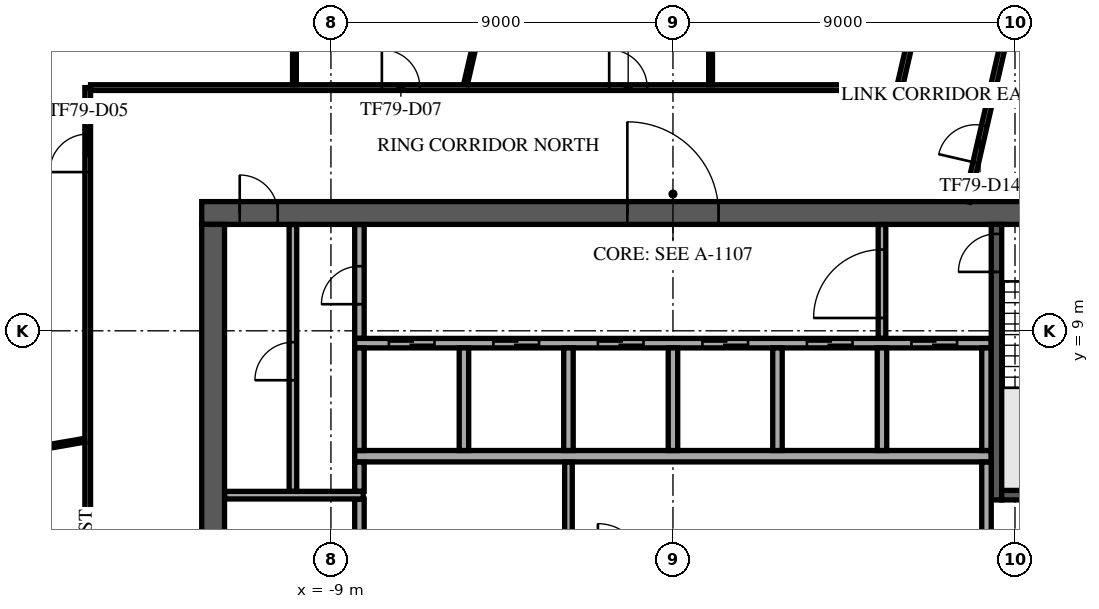
"""IFC4 building model, lengths in metres.
Left out: names, types, materials, properties, quantities, classifications, styles, units other than length and angle.
Written with IfcOpenShell. Run it as: python <this file> out.ifc"""

import sys

from ifc_helpers import new_model, si_unit, direction, frame, frame_2d, origin, place, context, subcontext, project, spatial, rectangle, extrude, element, fill, save


model = new_model("IFC4")
c1 = context("Model", 3, precision=1e-05, world=origin(), true_north=direction((0.0, 1.0)))
c2 = subcontext(c1, "Body", "Model", "MODEL_VIEW")
j1 = project(units=[si_unit("LENGTHUNIT", "METRE"), si_unit("PLANEANGLEUNIT", "RADIAN")], contexts=[c1])
p1 = place(None, origin())
s1 = spatial("IfcSite", under=j1, at=p1, CompositionType="ELEMENT")
p2 = place(p1, origin())
s2 = spatial("IfcBuilding", under=s1, at=p2, CompositionType="ELEMENT")
p3 = place(p2, frame((0.0, 0.0, 332.5)))
s3 = spatial("IfcBuildingStorey", under=s2, at=p3, CompositionType="ELEMENT", Elevation=332.5)
p4 = place(p3, frame((-12.4, 12.1, 0.0), z_axis=(0.0, 0.0, 1.0), x_axis=(1.0, 0.0, 0.0)))
e1 = element("IfcWall", 1, at=p4, inside=s3, PredefinedType="SHEAR", context=c2, shape_type="SweptSolid", body=[
    extrude(rectangle(XDim=24.8, YDim=0.6, at=frame_2d((12.4, 0.0))), origin(), (0.0, 0.0, 1.0), 3.65),
])
p5 = place(p4, frame((11.2, 0.0, 0.0)))
e2 = element("IfcOpeningElement", 2, at=p5, cuts=e1, PredefinedType="OPENING", context=c2, shape_type="SweptSolid", body=[
    extrude(rectangle(XDim=2.4, YDim=2.4, at=frame_2d((1.2, 1.2))), frame((0.0, 0.31, 0.0), z_axis=(0.0, -1.0, 0.0), x_axis=(1.0, 0.0, 0.0)), (0.0, 0.0, 1.0), 0.62),
])
p6 = place(p4, frame((22.025, 0.0, 0.0)))
e3 = element("IfcOpeningElement", 3, at=p6, cuts=e1, PredefinedType="OPENING", context=c2, shape_type="SweptSolid", body=[
    extrude(rectangle(XDim=1.2, YDim=2.1, at=frame_2d((0.6, 1.05))), frame((0.0, 0.31, 0.0), z_axis=(0.0, -1.0, 0.0), x_axis=(1.0, 0.0, 0.0)), (0.0, 0.0, 1.0), 0.62),
])
p7 = place(p4, frame((1.0, 0.0, 0.0)))
e4 = element("IfcOpeningElement", 4, at=p7, cuts=e1, PredefinedType="OPENING", context=c2, shape_type="SweptSolid", body=[
    extrude(rectangle(XDim=1.0, YDim=2.1, at=frame_2d((0.5, 1.05))), frame((0.0, 0.31, 0.0), z_axis=(0.0, -1.0, 0.0), x_axis=(1.0, 0.0, 0.0)), (0.0, 0.0, 1.0), 0.62),
])
p8 = place(p3, frame((-12.1, -11.8, 0.0), z_axis=(0.0, 0.0, 1.0), x_axis=(0.0, 1.0, 0.0)))
e5 = element("IfcWall", 5, at=p8, inside=s3, PredefinedType="SHEAR", context=c2, shape_type="SweptSolid", body=[
    extrude(rectangle(XDim=23.6, YDim=0.6, at=frame_2d((11.8, 0.0))), origin(), (0.0, 0.0, 1.0), 3.65),
])
p9 = place(p8, frame((10.6, 0.0, 0.0)))
e6 = element("IfcOpeningElement", 6, at=p9, cuts=e5, PredefinedType="OPENING", context=c2, shape_type="SweptSolid", body=[
    extrude(rectangle(XDim=2.4, YDim=2.4, at=frame_2d((1.2, 1.2))), frame((0.0, 0.31, 0.0), z_axis=(0.0, -1.0, 0.0), x_axis=(1.0, 0.0, 0.0)), (0.0, 0.0, 1.0), 0.62),
])
p10 = place(p3, frame((-8.375, 5.7, 0.0), z_axis=(0.0, 0.0, 1.0), x_axis=(1.0, 0.0, 0.0)))
e7 = element("IfcWall", 7, at=p10, inside=s3, PredefinedType="SOLIDWALL", context=c2, shape_type="SweptSolid", body=[
    extrude(rectangle(XDim=16.75, YDim=0.3, at=frame_2d((8.375, 0.0))), origin(), (0.0, 0.0, 1.0), 3.65),
])
p11 = place(p3, frame((-8.375, 8.675, 0.0), z_axis=(0.0, 0.0, 1.0), x_axis=(1.0, 0.0, 0.0)))
e8 = element("IfcWall", 8, at=p11, inside=s3, PredefinedType="SOLIDWALL", context=c2, shape_type="SweptSolid", body=[
    extrude(rectangle(XDim=16.75, YDim=0.25, at=frame_2d((8.375, 0.0))), origin(), (0.0, 0.0, 1.0), 3.65),
])
p12 = place(p11, frame((0.9, 0.0, 0.0)))
e9 = element("IfcOpeningElement", 9, at=p12, cuts=e8, PredefinedType="OPENING", context=c2, shape_type="SweptSolid", body=[
    extrude(rectangle(XDim=1.2, YDim=2.1, at=frame_2d((0.6, 1.05))), frame((0.0, 0.135, 0.0), z_axis=(0.0, -1.0, 0.0), x_axis=(1.0, 0.0, 0.0)), (0.0, 0.0, 1.0), 0.27),
])
p13 = place(p11, frame((3.65, 0.0, 0.0)))
e10 = element("IfcOpeningElement", 10, at=p13, cuts=e8, PredefinedType="OPENING", context=c2, shape_type="SweptSolid", body=[
    extrude(rectangle(XDim=1.2, YDim=2.1, at=frame_2d((0.6, 1.05))), frame((0.0, 0.135, 0.0), z_axis=(0.0, -1.0, 0.0), x_axis=(1.0, 0.0, 0.0)), (0.0, 0.0, 1.0), 0.27),
])
p14 = place(p11, frame((6.4, 0.0, 0.0)))
e11 = element("IfcOpeningElement", 11, at=p14, cuts=e8, PredefinedType="OPENING", context=c2, shape_type="SweptSolid", body=[
    extrude(rectangle(XDim=1.2, YDim=2.1, at=frame_2d((0.6, 1.05))), frame((0.0, 0.135, 0.0), z_axis=(0.0, -1.0, 0.0), x_axis=(1.0, 0.0, 0.0)), (0.0, 0.0, 1.0), 0.27),
])
p15 = place(p11, frame((9.15, 0.0, 0.0)))
e12 = element("IfcOpeningElement", 12, at=p15, cuts=e8, PredefinedType="OPENING", context=c2, shape_type="SweptSolid", body=[
    extrude(rectangle(XDim=1.2, YDim=2.1, at=frame_2d((0.6, 1.05))), frame((0.0, 0.135, 0.0), z_axis=(0.0, -1.0, 0.0), x_axis=(1.0, 0.0, 0.0)), (0.0, 0.0, 1.0), 0.27),
])
p16 = place(p11, frame((11.9, 0.0, 0.0)))
e13 = element("IfcOpeningElement", 13, at=p16, cuts=e8, PredefinedType="OPENING", context=c2, shape_type="SweptSolid", body=[
    extrude(rectangle(XDim=1.2, YDim=2.1, at=frame_2d((0.6, 1.05))), frame((0.0, 0.135, 0.0), z_axis=(0.0, -1.0, 0.0), x_axis=(1.0, 0.0, 0.0)), (0.0, 0.0, 1.0), 0.27),
])
p17 = place(p11, frame((14.65, 0.0, 0.0)))
e14 = element("IfcOpeningElement", 14, at=p17, cuts=e8, PredefinedType="OPENING", context=c2, shape_type="SweptSolid", body=[
    extrude(rectangle(XDim=1.2, YDim=2.1, at=frame_2d((0.6, 1.05))), frame((0.0, 0.135, 0.0), z_axis=(0.0, -1.0, 0.0), x_axis=(1.0, 0.0, 0.0)), (0.0, 0.0, 1.0), 0.27),
])
for number, where, z_axis, x_axis in (
    (15, (-8.25, 5.85, 0.0), (0.0, 0.0, 1.0), (0.0, 1.0, 0.0)),
    (16, (-5.5, 5.85, 0.0), (0.0, 0.0, 1.0), (0.0, 1.0, 0.0)),
    (17, (-2.75, 5.85, 0.0), (0.0, 0.0, 1.0), (0.0, 1.0, 0.0)),
    (18, (0.0, 5.85, 0.0), (0.0, 0.0, 1.0), (0.0, 1.0, 0.0)),
    (19, (2.75, 5.85, 0.0), (0.0, 0.0, 1.0), (0.0, 1.0, 0.0)),
    (20, (5.5, 5.85, 0.0), (0.0, 0.0, 1.0), (0.0, 1.0, 0.0)),
    (21, (8.25, 5.85, 0.0), (0.0, 0.0, 1.0), (0.0, 1.0, 0.0)),
):
    element("IfcWall", number, at=place(p3, frame(where, z_axis=z_axis, x_axis=x_axis)), inside=s3, PredefinedType="SOLIDWALL", context=c2, shape_type="SweptSolid", body=[
        extrude(rectangle(XDim=2.7, YDim=0.25, at=frame_2d((1.35, 0.0))), origin(), (0.0, 0.0, 1.0), 3.65),
    ])
p18 = place(p3, frame((8.512, 4.55, 0.0), z_axis=(0.0, 0.0, 1.0), x_axis=(0.0, 1.0, 0.0)))
e22 = element("IfcWall", 22, at=p18, inside=s3, PredefinedType="SOLIDWALL", context=c2, shape_type="SweptSolid", body=[
    extrude(rectangle(XDim=7.25, YDim=0.275, at=frame_2d((3.625, 0.0))), origin(), (0.0, 0.0, 1.0), 3.65),
])
p19 = place(p18, frame((6.0, 0.0, 0.0)))
e23 = element("IfcOpeningElement", 23, at=p19, cuts=e22, PredefinedType="OPENING", context=c2, shape_type="SweptSolid", body=[
    extrude(rectangle(XDim=1.0, YDim=2.1, at=frame_2d((0.5, 1.05))), frame((0.0, 0.147, 0.0), z_axis=(0.0, -1.0, 0.0), x_axis=(1.0, 0.0, 0.0)), (0.0, 0.0, 1.0), 0.295),
])
p20 = place(p3, frame((8.65, 4.675, 0.0), z_axis=(0.0, 0.0, 1.0), x_axis=(1.0, 0.0, 0.0)))
e24 = element("IfcWall", 24, at=p20, inside=s3, PredefinedType="SOLIDWALL", context=c2, shape_type="SweptSolid", body=[
    extrude(rectangle(XDim=3.15, YDim=0.25, at=frame_2d((1.575, 0.0))), origin(), (0.0, 0.0, 1.0), 3.65),
])
p21 = place(p3, frame((-8.25, 2.855, 0.0), z_axis=(0.0, 0.0, 1.0), x_axis=(0.0, 1.0, 0.0)))
e25 = element("IfcWall", 25, at=p21, inside=s3, PredefinedType="PARTITIONING", context=c2, shape_type="SweptSolid", body=[
    extrude(rectangle(XDim=1.715, YDim=0.25, at=frame_2d((0.857, 0.0))), origin(), (0.0, 0.0, 1.0), 3.65),
])
p22 = place(p3, frame((-2.75, 2.855, 0.0), z_axis=(0.0, 0.0, 1.0), x_axis=(0.0, 1.0, 0.0)))
e26 = element("IfcWall", 26, at=p22, inside=s3, PredefinedType="PARTITIONING", context=c2, shape_type="SweptSolid", body=[
    extrude(rectangle(XDim=2.69, YDim=0.2, at=frame_2d((1.345, 0.0))), origin(), (0.0, 0.0, 1.0), 3.65),
])
p23 = place(p3, frame((8.25, 2.855, 0.0), z_axis=(0.0, 0.0, 1.0), x_axis=(0.0, 1.0, 0.0)))
e27 = element("IfcWall", 27, at=p23, inside=s3, PredefinedType="PARTITIONING", context=c2, shape_type="SweptSolid", body=[
    extrude(rectangle(XDim=2.69, YDim=0.25, at=frame_2d((1.345, 0.0))), origin(), (0.0, 0.0, 1.0), 3.65),
])
p24 = place(p3, frame((-11.795, 4.675, 0.0), z_axis=(0.0, 0.0, 1.0), x_axis=(1.0, 0.0, 0.0)))
e28 = element("IfcWall", 28, at=p24, inside=s3, PredefinedType="PARTITIONING", context=c2, shape_type="SweptSolid", body=[
    extrude(rectangle(XDim=3.645, YDim=0.2, at=frame_2d((1.823, 0.0))), origin(), (0.0, 0.0, 1.0), 3.65),
])
p25 = place(p3, frame((-10.0, 4.78, 0.0), z_axis=(0.0, 0.0, 1.0), x_axis=(0.0, 1.0, 0.0)))
e29 = element("IfcWall", 29, at=p25, inside=s3, PredefinedType="PARTITIONING", context=c2, shape_type="SweptSolid", body=[
    extrude(rectangle(XDim=7.015, YDim=0.2, at=frame_2d((3.507, 0.0))), origin(), (0.0, 0.0, 1.0), 3.65),
])
p26 = place(p25, frame((2.92, 0.0, 0.0)))
e30 = element("IfcOpeningElement", 30, at=p26, cuts=e29, PredefinedType="OPENING", context=c2, shape_type="SweptSolid", body=[
    extrude(rectangle(XDim=1.0, YDim=2.1, at=frame_2d((0.5, 1.05))), frame((0.0, 0.11, 0.0), z_axis=(0.0, -1.0, 0.0), x_axis=(1.0, 0.0, 0.0)), (0.0, 0.0, 1.0), 0.22),
])
p27 = place(p3, frame((-8.25, 4.78, 0.0), z_axis=(0.0, 0.0, 1.0), x_axis=(0.0, 1.0, 0.0)))
e31 = element("IfcWall", 31, at=p27, inside=s3, PredefinedType="PARTITIONING", context=c2, shape_type="SweptSolid", body=[
    extrude(rectangle(XDim=0.765, YDim=0.25, at=frame_2d((0.382, 0.0))), origin(), (0.0, 0.0, 1.0), 3.65),
])
p28 = place(p3, frame((-8.25, 8.805, 0.0), z_axis=(0.0, 0.0, 1.0), x_axis=(0.0, 1.0, 0.0)))
e32 = element("IfcWall", 32, at=p28, inside=s3, PredefinedType="PARTITIONING", context=c2, shape_type="SweptSolid", body=[
    extrude(rectangle(XDim=2.99, YDim=0.25, at=frame_2d((1.495, 0.0))), origin(), (0.0, 0.0, 1.0), 3.65),
])
p29 = place(p28, frame((0.895, 0.0, 0.0)))
e33 = element("IfcOpeningElement", 33, at=p29, cuts=e32, PredefinedType="OPENING", context=c2, shape_type="SweptSolid", body=[
    extrude(rectangle(XDim=1.0, YDim=2.1, at=frame_2d((0.5, 1.05))), frame((0.0, 0.135, 0.0), z_axis=(0.0, -1.0, 0.0), x_axis=(1.0, 0.0, 0.0)), (0.0, 0.0, 1.0), 0.27),
])
p30 = place(p3, frame((5.5, 8.805, 0.0), z_axis=(0.0, 0.0, 1.0), x_axis=(0.0, 1.0, 0.0)))
e34 = element("IfcWall", 34, at=p30, inside=s3, PredefinedType="PARTITIONING", context=c2, shape_type="SweptSolid", body=[
    extrude(rectangle(XDim=2.99, YDim=0.2, at=frame_2d((1.495, 0.0))), origin(), (0.0, 0.0, 1.0), 3.65),
])
p31 = place(p30, frame((0.532, 0.0, 0.0)))
e35 = element("IfcOpeningElement", 35, at=p31, cuts=e34, PredefinedType="OPENING", context=c2, shape_type="SweptSolid", body=[
    extrude(rectangle(XDim=1.8, YDim=2.1, at=frame_2d((0.9, 1.05))), frame((0.0, 0.11, 0.0), z_axis=(0.0, -1.0, 0.0), x_axis=(1.0, 0.0, 0.0)), (0.0, 0.0, 1.0), 0.22),
])
p32 = place(p3, frame((-15.4, -15.4, 0.0), z_axis=(0.0, 0.0, 1.0), x_axis=(0.0, 1.0, 0.0)))
e36 = element("IfcWall", 36, at=p32, inside=s3, PredefinedType="PARTITIONING", context=c2, shape_type="SweptSolid", body=[
    extrude(rectangle(XDim=30.8, YDim=0.15, at=frame_2d((15.4, 0.0))), origin(), (0.0, 0.0, 1.0), 3.25),
])
p33 = place(p32, frame((12.741, 0.0, 0.0)))
e37 = element("IfcOpeningElement", 37, at=p33, cuts=e36, PredefinedType="OPENING", context=c2, shape_type="SweptSolid", body=[
    extrude(rectangle(XDim=1.0, YDim=2.1, at=frame_2d((0.5, 1.05))), frame((0.0, 0.085, 0.0), z_axis=(0.0, -1.0, 0.0), x_axis=(1.0, 0.0, 0.0)), (0.0, 0.0, 1.0), 0.17),
])
p34 = place(p32, frame((6.05, 0.0, 0.0)))
e38 = element("IfcOpeningElement", 38, at=p34, cuts=e36, PredefinedType="OPENING", context=c2, shape_type="SweptSolid", body=[
    extrude(rectangle(XDim=1.8, YDim=2.1, at=frame_2d((0.9, 1.05))), frame((0.0, 0.085, 0.0), z_axis=(0.0, -1.0, 0.0), x_axis=(1.0, 0.0, 0.0)), (0.0, 0.0, 1.0), 0.17),
])
p35 = place(p32, frame((28.577, 0.0, 0.0)))
e39 = element("IfcOpeningElement", 39, at=p35, cuts=e36, PredefinedType="OPENING", context=c2, shape_type="SweptSolid", body=[
    extrude(rectangle(XDim=1.0, YDim=2.1, at=frame_2d((0.5, 1.05))), frame((0.0, 0.085, 0.0), z_axis=(0.0, -1.0, 0.0), x_axis=(1.0, 0.0, 0.0)), (0.0, 0.0, 1.0), 0.17),
])
p36 = place(p3, frame((-15.325, 15.4, 0.0), z_axis=(0.0, 0.0, 1.0), x_axis=(1.0, 0.0, 0.0)))
e40 = element("IfcWall", 40, at=p36, inside=s3, PredefinedType="PARTITIONING", context=c2, shape_type="SweptSolid", body=[
    extrude(rectangle(XDim=21.285, YDim=0.15, at=frame_2d((10.643, 0.0))), origin(), (0.0, 0.0, 1.0), 3.25),
])
p37 = place(p36, frame((7.665, 0.0, 0.0)))
e41 = element("IfcOpeningElement", 41, at=p37, cuts=e40, PredefinedType="OPENING", context=c2, shape_type="SweptSolid", body=[
    extrude(rectangle(XDim=1.0, YDim=2.1, at=frame_2d((0.5, 1.05))), frame((0.0, 0.085, 0.0), z_axis=(0.0, -1.0, 0.0), x_axis=(1.0, 0.0, 0.0)), (0.0, 0.0, 1.0), 0.17),
])
p38 = place(p36, frame((13.647, 0.0, 0.0)))
e42 = element("IfcOpeningElement", 42, at=p38, cuts=e40, PredefinedType="OPENING", context=c2, shape_type="SweptSolid", body=[
    extrude(rectangle(XDim=1.0, YDim=2.1, at=frame_2d((0.5, 1.05))), frame((0.0, 0.085, 0.0), z_axis=(0.0, -1.0, 0.0), x_axis=(1.0, 0.0, 0.0)), (0.0, 0.0, 1.0), 0.17),
])
p39 = place(p3, frame((5.981, 15.492, 0.0), z_axis=(0.0, 0.0, 1.0), x_axis=(0.224777043794, 0.97441022192, 0.0)))
e43 = element("IfcWall", 43, at=p39, inside=s3, PredefinedType="PARTITIONING", context=c2, shape_type="SweptSolid", body=[
    extrude(rectangle(XDim=2.811, YDim=0.15, at=frame_2d((1.406, 0.0))), origin(), (0.0, 0.0, 1.0), 3.65),
])
p40 = place(p3, frame((7.731, 12.4, 0.0), z_axis=(0.0, 0.0, 1.0), x_axis=(0.224891896022, 0.974383720668, 0.0)))
e44 = element("IfcWall", 44, at=p40, inside=s3, PredefinedType="PARTITIONING", context=c2, shape_type="SweptSolid", body=[
    extrude(rectangle(XDim=5.505, YDim=0.15, at=frame_2d((2.752, 0.0))), origin(), (0.0, 0.0, 1.0), 3.13),
])
p41 = place(p40, frame((1.05, 0.0, 0.0)))
e45 = element("IfcOpeningElement", 45, at=p41, cuts=e44, PredefinedType="OPENING", context=c2, shape_type="SweptSolid", body=[
    extrude(rectangle(XDim=1.0, YDim=2.1, at=frame_2d((0.5, 1.05))), frame((0.0, 0.085, 0.0), z_axis=(0.0, -1.0, 0.0), x_axis=(1.0, 0.0, 0.0)), (0.0, 0.0, 1.0), 0.17),
])
p42 = place(p3, frame((9.042, 17.747, 0.0), z_axis=(0.0, 0.0, 1.0), x_axis=(0.974374231644, -0.224933004931, 0.0)))
e46 = element("IfcWall", 46, at=p42, inside=s3, PredefinedType="PARTITIONING", context=c2, shape_type="SweptSolid", body=[
    extrude(rectangle(XDim=12.858, YDim=0.15, at=frame_2d((6.429, 0.0))), origin(), (0.0, 0.0, 1.0), 3.25),
])
p43 = place(p3, frame((-26.103, 4.284, 0.0), z_axis=(0.0, 0.0, 1.0), x_axis=(0.985391107222, 0.170306681627, 0.0)))
e47 = element("IfcWall", 47, at=p43, inside=s3, PredefinedType="PARTITIONING", context=c2, shape_type="SweptSolid", body=[
    extrude(rectangle(XDim=10.777, YDim=0.1, at=frame_2d((5.389, 0.0))), origin(), (0.0, 0.0, 1.0), 3.05),
])
p44 = place(p3, frame((-9.96, 15.475, 0.0), z_axis=(0.0, 0.0, 1.0), x_axis=(0.0, 1.0, 0.0)))
e48 = element("IfcWall", 48, at=p44, inside=s3, PredefinedType="PARTITIONING", context=c2, shape_type="SweptSolid", body=[
    extrude(rectangle(XDim=6.57, YDim=0.1, at=frame_2d((3.285, 0.0))), origin(), (0.0, 0.0, 1.0), 3.65),
])
p45 = place(p3, frame((-5.458, 15.486, 0.0), z_axis=(0.0, 0.0, 1.0), x_axis=(0.224899204936, 0.974382033711, 0.0)))
e49 = element("IfcWall", 49, at=p45, inside=s3, PredefinedType="PARTITIONING", context=c2, shape_type="SweptSolid", body=[
    extrude(rectangle(XDim=5.39, YDim=0.1, at=frame_2d((2.695, 0.0))), origin(), (0.0, 0.0, 1.0), 3.13),
])
p46 = place(p3, frame((0.99, 15.475, 0.0), z_axis=(0.0, 0.0, 1.0), x_axis=(0.0, 1.0, 0.0)))
e50 = element("IfcWall", 50, at=p46, inside=s3, PredefinedType="PARTITIONING", context=c2, shape_type="SweptSolid", body=[
    extrude(rectangle(XDim=4.042, YDim=0.1, at=frame_2d((2.021, 0.0))), origin(), (0.0, 0.0, 1.0), 3.65),
])
p47 = place(p5, origin())
e51 = element("IfcDoor", 51, at=p47, inside=s3, OperationType="SINGLE_SWING_LEFT", PredefinedType="DOOR", context=c2, shape_type="SweptSolid", body=[
    extrude(rectangle(XDim=2.4, YDim=2.4, at=frame_2d((1.2, 1.2))), frame((0.0, 0.025, 0.0), z_axis=(0.0, -1.0, 0.0), x_axis=(1.0, 0.0, 0.0)), (0.0, 0.0, 1.0), 0.05),
])
fill(e2, e51)
p48 = place(p7, origin())
e52 = element("IfcDoor", 52, at=p48, inside=s3, OperationType="SINGLE_SWING_LEFT", PredefinedType="DOOR", context=c2, shape_type="SweptSolid", body=[
    extrude(rectangle(XDim=1.0, YDim=2.1, at=frame_2d((0.5, 1.05))), frame((0.0, 0.025, 0.0), z_axis=(0.0, -1.0, 0.0), x_axis=(1.0, 0.0, 0.0)), (0.0, 0.0, 1.0), 0.05),
])
fill(e4, e52)
p49 = place(p12, origin())
e53 = element("IfcDoor", 53, at=p49, inside=s3, OperationType="DOUBLE_DOOR_SLIDING", PredefinedType="DOOR", context=c2, shape_type="SweptSolid", body=[
    extrude(rectangle(XDim=1.2, YDim=2.1, at=frame_2d((0.6, 1.05))), frame((0.0, 0.025, 0.0), z_axis=(0.0, -1.0, 0.0), x_axis=(1.0, 0.0, 0.0)), (0.0, 0.0, 1.0), 0.05),
])
fill(e9, e53)
p50 = place(p13, origin())
e54 = element("IfcDoor", 54, at=p50, inside=s3, OperationType="DOUBLE_DOOR_SLIDING", PredefinedType="DOOR", context=c2, shape_type="SweptSolid", body=[
    extrude(rectangle(XDim=1.2, YDim=2.1, at=frame_2d((0.6, 1.05))), frame((0.0, 0.025, 0.0), z_axis=(0.0, -1.0, 0.0), x_axis=(1.0, 0.0, 0.0)), (0.0, 0.0, 1.0), 0.05),
])
fill(e10, e54)
p51 = place(p14, origin())
e55 = element("IfcDoor", 55, at=p51, inside=s3, OperationType="DOUBLE_DOOR_SLIDING", PredefinedType="DOOR", context=c2, shape_type="SweptSolid", body=[
    extrude(rectangle(XDim=1.2, YDim=2.1, at=frame_2d((0.6, 1.05))), frame((0.0, 0.025, 0.0), z_axis=(0.0, -1.0, 0.0), x_axis=(1.0, 0.0, 0.0)), (0.0, 0.0, 1.0), 0.05),
])
fill(e11, e55)
p52 = place(p15, origin())
e56 = element("IfcDoor", 56, at=p52, inside=s3, OperationType="DOUBLE_DOOR_SLIDING", PredefinedType="DOOR", context=c2, shape_type="SweptSolid", body=[
    extrude(rectangle(XDim=1.2, YDim=2.1, at=frame_2d((0.6, 1.05))), frame((0.0, 0.025, 0.0), z_axis=(0.0, -1.0, 0.0), x_axis=(1.0, 0.0, 0.0)), (0.0, 0.0, 1.0), 0.05),
])
fill(e12, e56)
p53 = place(p16, origin())
e57 = element("IfcDoor", 57, at=p53, inside=s3, OperationType="DOUBLE_DOOR_SLIDING", PredefinedType="DOOR", context=c2, shape_type="SweptSolid", body=[
    extrude(rectangle(XDim=1.2, YDim=2.1, at=frame_2d((0.6, 1.05))), frame((0.0, 0.025, 0.0), z_axis=(0.0, -1.0, 0.0), x_axis=(1.0, 0.0, 0.0)), (0.0, 0.0, 1.0), 0.05),
])
fill(e13, e57)
p54 = place(p17, origin())
e58 = element("IfcDoor", 58, at=p54, inside=s3, OperationType="DOUBLE_DOOR_SLIDING", PredefinedType="DOOR", context=c2, shape_type="SweptSolid", body=[
    extrude(rectangle(XDim=1.2, YDim=2.1, at=frame_2d((0.6, 1.05))), frame((0.0, 0.025, 0.0), z_axis=(0.0, -1.0, 0.0), x_axis=(1.0, 0.0, 0.0)), (0.0, 0.0, 1.0), 0.05),
])
fill(e14, e58)
p55 = place(p19, origin())
e59 = element("IfcDoor", 59, at=p55, inside=s3, OperationType="SINGLE_SWING_LEFT", PredefinedType="DOOR", context=c2, shape_type="SweptSolid", body=[
    extrude(rectangle(XDim=1.0, YDim=2.1, at=frame_2d((0.5, 1.05))), frame((0.0, 0.025, 0.0), z_axis=(0.0, -1.0, 0.0), x_axis=(1.0, 0.0, 0.0)), (0.0, 0.0, 1.0), 0.05),
])
fill(e23, e59)
p56 = place(p26, origin())
e60 = element("IfcDoor", 60, at=p56, inside=s3, OperationType="SINGLE_SWING_RIGHT", PredefinedType="DOOR", context=c2, shape_type="SweptSolid", body=[
    extrude(rectangle(XDim=1.0, YDim=2.1, at=frame_2d((0.5, 1.05))), frame((0.0, 0.025, 0.0), z_axis=(0.0, -1.0, 0.0), x_axis=(1.0, 0.0, 0.0)), (0.0, 0.0, 1.0), 0.05),
])
fill(e30, e60)
p57 = place(p29, origin())
e61 = element("IfcDoor", 61, at=p57, inside=s3, OperationType="SINGLE_SWING_RIGHT", PredefinedType="DOOR", context=c2, shape_type="SweptSolid", body=[
    extrude(rectangle(XDim=1.0, YDim=2.1, at=frame_2d((0.5, 1.05))), frame((0.0, 0.025, 0.0), z_axis=(0.0, -1.0, 0.0), x_axis=(1.0, 0.0, 0.0)), (0.0, 0.0, 1.0), 0.05),
])
fill(e33, e61)
p58 = place(p31, origin())
e62 = element("IfcDoor", 62, at=p58, inside=s3, OperationType="SINGLE_SWING_LEFT", PredefinedType="DOOR", context=c2, shape_type="SweptSolid", body=[
    extrude(rectangle(XDim=1.8, YDim=2.1, at=frame_2d((0.9, 1.05))), frame((0.0, 0.025, 0.0), z_axis=(0.0, -1.0, 0.0), x_axis=(1.0, 0.0, 0.0)), (0.0, 0.0, 1.0), 0.05),
])
fill(e35, e62)
p59 = place(p35, origin())
e63 = element("IfcDoor", 63, at=p59, inside=s3, OperationType="SINGLE_SWING_RIGHT", PredefinedType="DOOR", context=c2, shape_type="SweptSolid", body=[
    extrude(rectangle(XDim=1.0, YDim=2.1, at=frame_2d((0.5, 1.05))), frame((0.0, 0.025, 0.0), z_axis=(0.0, -1.0, 0.0), x_axis=(1.0, 0.0, 0.0)), (0.0, 0.0, 1.0), 0.05),
])
fill(e39, e63)
p60 = place(p37, origin())
e64 = element("IfcDoor", 64, at=p60, inside=s3, OperationType="SINGLE_SWING_LEFT", PredefinedType="DOOR", context=c2, shape_type="SweptSolid", body=[
    extrude(rectangle(XDim=1.0, YDim=2.1, at=frame_2d((0.5, 1.05))), frame((0.0, 0.025, 0.0), z_axis=(0.0, -1.0, 0.0), x_axis=(1.0, 0.0, 0.0)), (0.0, 0.0, 1.0), 0.05),
])
fill(e41, e64)
p61 = place(p38, origin())
e65 = element("IfcDoor", 65, at=p61, inside=s3, OperationType="SINGLE_SWING_RIGHT", PredefinedType="DOOR", context=c2, shape_type="SweptSolid", body=[
    extrude(rectangle(XDim=1.0, YDim=2.1, at=frame_2d((0.5, 1.05))), frame((0.0, 0.025, 0.0), z_axis=(0.0, -1.0, 0.0), x_axis=(1.0, 0.0, 0.0)), (0.0, 0.0, 1.0), 0.05),
])
fill(e42, e65)
p62 = place(p41, frame((1.0, 0.0, 0.0), z_axis=(0.0, 0.0, 1.0), x_axis=(-1.0, 0.0, 0.0)))
e66 = element("IfcDoor", 66, at=p62, inside=s3, OperationType="SINGLE_SWING_RIGHT", PredefinedType="DOOR", context=c2, shape_type="SweptSolid", body=[
    extrude(rectangle(XDim=1.0, YDim=2.1, at=frame_2d((0.5, 1.05))), frame((0.0, 0.025, 0.0), z_axis=(0.0, -1.0, 0.0), x_axis=(1.0, 0.0, 0.0)), (0.0, 0.0, 1.0), 0.05),
])
fill(e45, e66)
save(model, sys.argv[1])
